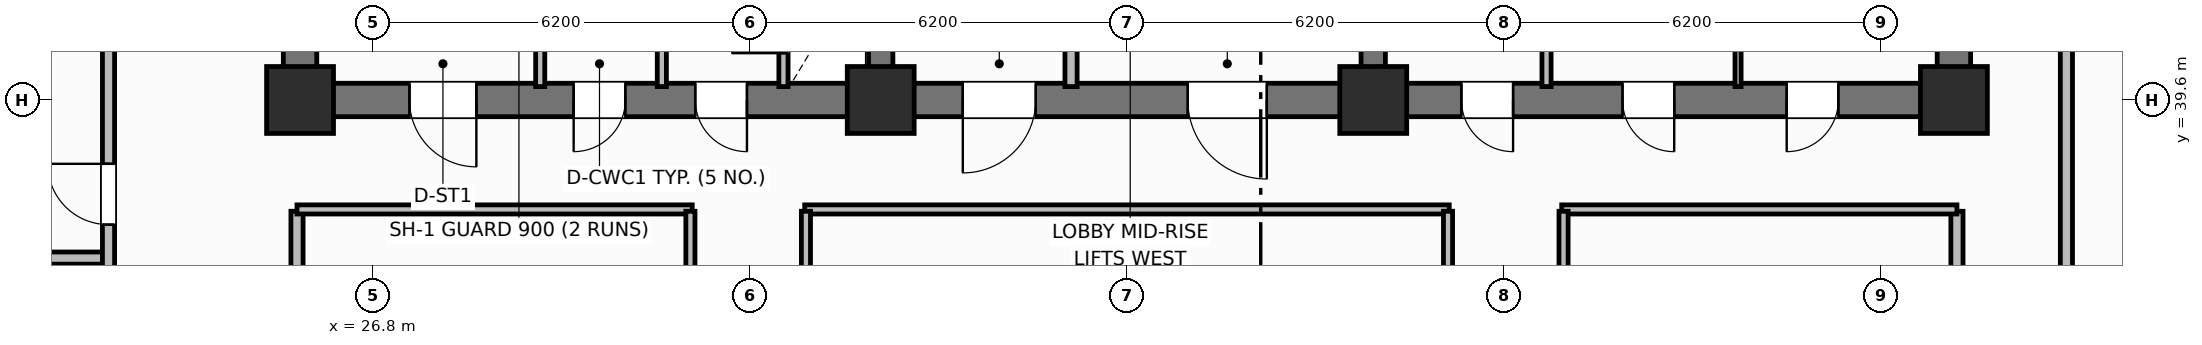
"""IFC4 building model, lengths in metres.
Left out: names, types, materials, properties, quantities, classifications, styles, units other than length and angle.
Written with IfcOpenShell. Run it as: python <this file> out.ifc"""

import sys

from ifc_helpers import new_model, si_unit, direction, frame, frame_2d, origin, origin_2d, place, context, subcontext, project, spatial, rectangle, extrude, element, fill, save


model = new_model("IFC4")
c1 = context("Model", 3, precision=1e-05, world=origin(), true_north=direction((0.0, 1.0)))
c2 = subcontext(c1, "Body", "Model", "MODEL_VIEW")
j1 = project(units=[si_unit("LENGTHUNIT", "METRE"), si_unit("PLANEANGLEUNIT", "RADIAN")], contexts=[c1])
p1 = place(None, origin())
s1 = spatial("IfcSite", under=j1, at=p1, CompositionType="ELEMENT")
p2 = place(p1, origin())
s2 = spatial("IfcBuilding", under=s1, at=p2, CompositionType="ELEMENT")
p3 = place(p2, frame((0.0, 0.0, 95.7)))
s3 = spatial("IfcBuildingStorey", under=s2, at=p3, CompositionType="ELEMENT", Elevation=95.7)
for number, where, z_axis, x_axis in (
    (1, (25.6, 39.875, 0.0), (0.0, 0.0, 1.0), (0.0, 1.0, 0.0)),
    (2, (52.8, 39.875, 0.0), (0.0, 0.0, 1.0), (0.0, 1.0, 0.0)),
):
    element("IfcWall", number, at=place(p3, frame(where, z_axis=z_axis, x_axis=x_axis)), inside=s3, PredefinedType="SHEAR", context=c2, shape_type="SweptSolid", body=[
        extrude(rectangle(XDim=5.65, YDim=0.55, at=frame_2d((2.825, 0.0))), origin(), (0.0, 0.0, 1.0), 3.7),
    ])
p4 = place(p3, frame((52.8, 39.6, 0.0), z_axis=(0.0, 0.0, 1.0), x_axis=(-1.0, 0.0, 0.0)))
e3 = element("IfcWall", 3, at=p4, inside=s3, PredefinedType="SHEAR", context=c2, shape_type="SweptSolid", body=[
    extrude(rectangle(XDim=27.2, YDim=0.55, at=frame_2d((13.6, 0.0))), origin(), (0.0, 0.0, 1.0), 3.7),
])
p5 = place(p4, frame((24.3, 0.0, 0.0)))
e4 = element("IfcOpeningElement", 4, at=p5, cuts=e3, PredefinedType="OPENING", context=c2, shape_type="SweptSolid", body=[
    extrude(rectangle(XDim=1.1, YDim=2.15, at=frame_2d((0.55, 1.075))), frame((0.0, 0.285, 0.0), z_axis=(0.0, -1.0, 0.0), x_axis=(1.0, 0.0, 0.0)), (0.0, 0.0, 1.0), 0.57),
])
p6 = place(p4, frame((21.85, 0.0, 0.0)))
e5 = element("IfcOpeningElement", 5, at=p6, cuts=e3, PredefinedType="OPENING", context=c2, shape_type="SweptSolid", body=[
    extrude(rectangle(XDim=0.85, YDim=2.1, at=frame_2d((0.425, 1.05))), frame((0.0, 0.285, 0.0), z_axis=(0.0, -1.0, 0.0), x_axis=(1.0, 0.0, 0.0)), (0.0, 0.0, 1.0), 0.57),
])
p7 = place(p4, frame((19.85, 0.0, 0.0)))
e6 = element("IfcOpeningElement", 6, at=p7, cuts=e3, PredefinedType="OPENING", context=c2, shape_type="SweptSolid", body=[
    extrude(rectangle(XDim=0.85, YDim=2.1, at=frame_2d((0.425, 1.05))), frame((0.0, 0.285, 0.0), z_axis=(0.0, -1.0, 0.0), x_axis=(1.0, 0.0, 0.0)), (0.0, 0.0, 1.0), 0.57),
])
p8 = place(p4, frame((15.1, 0.0, 0.0)))
e7 = element("IfcOpeningElement", 7, at=p8, cuts=e3, PredefinedType="OPENING", context=c2, shape_type="SweptSolid", body=[
    extrude(rectangle(XDim=1.2, YDim=2.15, at=frame_2d((0.6, 1.075))), frame((0.0, 0.285, 0.0), z_axis=(0.0, -1.0, 0.0), x_axis=(1.0, 0.0, 0.0)), (0.0, 0.0, 1.0), 0.57),
])
p9 = place(p4, frame((11.3, 0.0, 0.0)))
e8 = element("IfcOpeningElement", 8, at=p9, cuts=e3, PredefinedType="OPENING", context=c2, shape_type="SweptSolid", body=[
    extrude(rectangle(XDim=1.3, YDim=2.2, at=frame_2d((0.65, 1.1))), frame((0.0, 0.285, 0.0), z_axis=(0.0, -1.0, 0.0), x_axis=(1.0, 0.0, 0.0)), (0.0, 0.0, 1.0), 0.57),
])
p10 = place(p4, frame((7.25, 0.0, 0.0)))
e9 = element("IfcOpeningElement", 9, at=p10, cuts=e3, PredefinedType="OPENING", context=c2, shape_type="SweptSolid", body=[
    extrude(rectangle(XDim=0.85, YDim=2.1, at=frame_2d((0.425, 1.05))), frame((0.0, 0.285, 0.0), z_axis=(0.0, -1.0, 0.0), x_axis=(1.0, 0.0, 0.0)), (0.0, 0.0, 1.0), 0.57),
])
p11 = place(p4, frame((4.6, 0.0, 0.0)))
e10 = element("IfcOpeningElement", 10, at=p11, cuts=e3, PredefinedType="OPENING", context=c2, shape_type="SweptSolid", body=[
    extrude(rectangle(XDim=0.85, YDim=2.1, at=frame_2d((0.425, 1.05))), frame((0.0, 0.285, 0.0), z_axis=(0.0, -1.0, 0.0), x_axis=(1.0, 0.0, 0.0)), (0.0, 0.0, 1.0), 0.57),
])
p12 = place(p4, frame((1.9, 0.0, 0.0)))
e11 = element("IfcOpeningElement", 11, at=p12, cuts=e3, PredefinedType="OPENING", context=c2, shape_type="SweptSolid", body=[
    extrude(rectangle(XDim=0.85, YDim=2.1, at=frame_2d((0.425, 1.05))), frame((0.0, 0.285, 0.0), z_axis=(0.0, -1.0, 0.0), x_axis=(1.0, 0.0, 0.0)), (0.0, 0.0, 1.0), 0.57),
])
for number, where, z_axis, x_axis in (
    (12, (35.15, 39.875, 0.0), (0.0, 0.0, 1.0), (0.0, 1.0, 0.0)),
    (13, (43.25, 39.875, 0.0), (0.0, 0.0, 1.0), (0.0, 1.0, 0.0)),
):
    element("IfcWall", number, at=place(p3, frame(where, z_axis=z_axis, x_axis=x_axis)), inside=s3, PredefinedType="SHEAR", context=c2, shape_type="SweptSolid", body=[
        extrude(rectangle(XDim=5.65, YDim=0.4, at=frame_2d((2.825, 0.0))), origin(), (0.0, 0.0, 1.0), 3.7),
    ])
for number, where, z_axis, x_axis in (
    (14, (25.6, 39.6, 0.0), (0.0, 0.0, 1.0), (1.0, 0.0, 0.0)),
    (15, (35.15, 39.6, 0.0), (0.0, 0.0, 1.0), (1.0, 0.0, 0.0)),
    (16, (43.25, 39.6, 0.0), (0.0, 0.0, 1.0), (1.0, 0.0, 0.0)),
    (17, (52.8, 39.6, 0.0), (0.0, 0.0, 1.0), (1.0, 0.0, 0.0)),
):
    element("IfcColumn", number, at=place(p3, frame(where, z_axis=z_axis, x_axis=x_axis)), inside=s3, PredefinedType="COLUMN", context=c2, shape_type="SweptSolid", body=[
        extrude(rectangle(XDim=1.1, YDim=1.1, at=origin_2d()), origin(), (0.0, 0.0, 1.0), 3.7),
    ])
p13 = place(p3, frame((33.55, 39.82, 0.0), z_axis=(0.0, 0.0, 1.0), x_axis=(0.0, 1.0, 0.0)))
e18 = element("IfcWall", 18, at=p13, inside=s3, PredefinedType="PARTITIONING", context=c2, shape_type="SweptSolid", body=[
    extrude(rectangle(XDim=2.13, YDim=0.15, at=frame_2d((1.065, 0.0))), origin(), (0.0, 0.0, 1.0), 2.53),
])
p14 = place(p13, frame((0.55, 0.0, 0.0)))
e19 = element("IfcOpeningElement", 19, at=p14, cuts=e18, PredefinedType="OPENING", context=c2, shape_type="SweptSolid", body=[
    extrude(rectangle(XDim=0.85, YDim=2.05, at=frame_2d((0.425, 1.025))), frame((0.0, 0.085, 0.0), z_axis=(0.0, -1.0, 0.0), x_axis=(1.0, 0.0, 0.0)), (0.0, 0.0, 1.0), 0.17),
])
for number, where, z_axis, x_axis in (
    (20, (29.55, 39.82, 0.0), (0.0, 0.0, 1.0), (0.0, 1.0, 0.0)),
    (21, (31.55, 39.82, 0.0), (0.0, 0.0, 1.0), (0.0, 1.0, 0.0)),
):
    element("IfcWall", number, at=place(p3, frame(where, z_axis=z_axis, x_axis=x_axis)), inside=s3, PredefinedType="PARTITIONING", context=c2, shape_type="SweptSolid", body=[
        extrude(rectangle(XDim=2.13, YDim=0.15, at=frame_2d((1.065, 0.0))), origin(), (0.0, 0.0, 1.0), 2.53),
    ])
p15 = place(p3, frame((38.28, 39.82, 0.0), z_axis=(0.0, 0.0, 1.0), x_axis=(0.0, 1.0, 0.0)))
e22 = element("IfcWall", 22, at=p15, inside=s3, PredefinedType="PARTITIONING", context=c2, shape_type="SweptSolid", body=[
    extrude(rectangle(XDim=2.73, YDim=0.2, at=frame_2d((1.365, 0.0))), origin(), (0.0, 0.0, 1.0), 2.53),
])
p16 = place(p3, frame((46.1, 39.82, 0.0), z_axis=(0.0, 0.0, 1.0), x_axis=(0.0, 1.0, 0.0)))
e23 = element("IfcWall", 23, at=p16, inside=s3, PredefinedType="PARTITIONING", context=c2, shape_type="SweptSolid", body=[
    extrude(rectangle(XDim=2.73, YDim=0.15, at=frame_2d((1.365, 0.0))), origin(), (0.0, 0.0, 1.0), 2.53),
])
p17 = place(p3, frame((49.25, 39.82, 0.0), z_axis=(0.0, 0.0, 1.0), x_axis=(0.0, 1.0, 0.0)))
e24 = element("IfcWall", 24, at=p17, inside=s3, PredefinedType="PARTITIONING", context=c2, shape_type="SweptSolid", body=[
    extrude(rectangle(XDim=2.73, YDim=0.1, at=frame_2d((1.365, 0.0))), origin(), (0.0, 0.0, 1.0), 2.53),
])
for number, where, z_axis, x_axis in (
    (25, (25.55, 18.63, 0.0), (0.0, 0.0, 1.0), (0.0, 1.0, 0.0)),
    (26, (52.85, 18.63, 0.0), (0.0, 0.0, 1.0), (0.0, 1.0, 0.0)),
):
    element("IfcWall", number, at=place(p3, frame(where, z_axis=z_axis, x_axis=x_axis)), inside=s3, PredefinedType="PARTITIONING", context=c2, shape_type="SweptSolid", body=[
        extrude(rectangle(XDim=19.14, YDim=0.2, at=frame_2d((9.57, 0.0))), origin(), (0.0, 0.0, 1.0), 2.53),
    ])
p18 = place(p3, frame((25.55, 37.8, 0.0), z_axis=(0.0, 0.0, 1.0), x_axis=(1.0, 0.0, 0.0)))
e27 = element("IfcWall", 27, at=p18, inside=s3, PredefinedType="PARTITIONING", context=c2, shape_type="SweptSolid", body=[
    extrude(rectangle(XDim=6.5, YDim=0.15, at=frame_2d((3.25, 0.0))), origin(), (0.0, 0.0, 1.0), 2.53),
])
p19 = place(p3, frame((33.9, 37.8, 0.0), z_axis=(0.0, 0.0, 1.0), x_axis=(1.0, 0.0, 0.0)))
e28 = element("IfcWall", 28, at=p19, inside=s3, PredefinedType="PARTITIONING", context=c2, shape_type="SweptSolid", body=[
    extrude(rectangle(XDim=10.6, YDim=0.15, at=frame_2d((5.3, 0.0))), origin(), (0.0, 0.0, 1.0), 2.53),
])
p20 = place(p3, frame((46.35, 37.8, 0.0), z_axis=(0.0, 0.0, 1.0), x_axis=(1.0, 0.0, 0.0)))
e29 = element("IfcWall", 29, at=p20, inside=s3, PredefinedType="PARTITIONING", context=c2, shape_type="SweptSolid", body=[
    extrude(rectangle(XDim=6.5, YDim=0.15, at=frame_2d((3.25, 0.0))), origin(), (0.0, 0.0, 1.0), 2.53),
])
p21 = place(p3, frame((32.02, 18.63, 0.0), z_axis=(0.0, 0.0, 1.0), x_axis=(0.0, 1.0, 0.0)))
e30 = element("IfcWall", 30, at=p21, inside=s3, PredefinedType="PARTITIONING", context=c2, shape_type="SweptSolid", body=[
    extrude(rectangle(XDim=19.14, YDim=0.15, at=frame_2d((9.57, 0.0))), origin(), (0.0, 0.0, 1.0), 2.53),
])
p22 = place(p21, frame((3.0, 0.0, 0.0)))
e31 = element("IfcOpeningElement", 31, at=p22, cuts=e30, PredefinedType="OPENING", context=c2, shape_type="SweptSolid", body=[
    extrude(rectangle(XDim=0.9, YDim=2.1, at=frame_2d((0.45, 1.05))), frame((0.0, 0.085, 0.0), z_axis=(0.0, -1.0, 0.0), x_axis=(1.0, 0.0, 0.0)), (0.0, 0.0, 1.0), 0.17),
])
p23 = place(p21, frame((11.5, 0.0, 0.0)))
e32 = element("IfcOpeningElement", 32, at=p23, cuts=e30, PredefinedType="OPENING", context=c2, shape_type="SweptSolid", body=[
    extrude(rectangle(XDim=0.9, YDim=2.1, at=frame_2d((0.45, 1.05))), frame((0.0, 0.085, 0.0), z_axis=(0.0, -1.0, 0.0), x_axis=(1.0, 0.0, 0.0)), (0.0, 0.0, 1.0), 0.17),
])
p24 = place(p3, frame((33.92, 18.63, 0.0), z_axis=(0.0, 0.0, 1.0), x_axis=(0.0, 1.0, 0.0)))
e33 = element("IfcWall", 33, at=p24, inside=s3, PredefinedType="PARTITIONING", context=c2, shape_type="SweptSolid", body=[
    extrude(rectangle(XDim=19.14, YDim=0.15, at=frame_2d((9.57, 0.0))), origin(), (0.0, 0.0, 1.0), 2.53),
])
p25 = place(p24, frame((2.4, 0.0, 0.0)))
e34 = element("IfcOpeningElement", 34, at=p25, cuts=e33, PredefinedType="OPENING", context=c2, shape_type="SweptSolid", body=[
    extrude(rectangle(XDim=0.9, YDim=2.1, at=frame_2d((0.45, 1.05))), frame((0.0, 0.085, 0.0), z_axis=(0.0, -1.0, 0.0), x_axis=(1.0, 0.0, 0.0)), (0.0, 0.0, 1.0), 0.17),
])
p26 = place(p3, frame((44.48, 18.63, 0.0), z_axis=(0.0, 0.0, 1.0), x_axis=(0.0, 1.0, 0.0)))
e35 = element("IfcWall", 35, at=p26, inside=s3, PredefinedType="PARTITIONING", context=c2, shape_type="SweptSolid", body=[
    extrude(rectangle(XDim=19.14, YDim=0.15, at=frame_2d((9.57, 0.0))), origin(), (0.0, 0.0, 1.0), 2.53),
])
p27 = place(p26, frame((9.847, 0.0, 0.0)))
e36 = element("IfcOpeningElement", 36, at=p27, cuts=e35, PredefinedType="OPENING", context=c2, shape_type="SweptSolid", body=[
    extrude(rectangle(XDim=0.9, YDim=2.1, at=frame_2d((0.45, 1.05))), frame((0.0, 0.085, 0.0), z_axis=(0.0, -1.0, 0.0), x_axis=(1.0, 0.0, 0.0)), (0.0, 0.0, 1.0), 0.17),
])
p28 = place(p3, frame((46.38, 18.63, 0.0), z_axis=(0.0, 0.0, 1.0), x_axis=(0.0, 1.0, 0.0)))
e37 = element("IfcWall", 37, at=p28, inside=s3, PredefinedType="PARTITIONING", context=c2, shape_type="SweptSolid", body=[
    extrude(rectangle(XDim=19.14, YDim=0.15, at=frame_2d((9.57, 0.0))), origin(), (0.0, 0.0, 1.0), 2.53),
])
p29 = place(p28, frame((5.5, 0.0, 0.0)))
e38 = element("IfcOpeningElement", 38, at=p29, cuts=e37, PredefinedType="OPENING", context=c2, shape_type="SweptSolid", body=[
    extrude(rectangle(XDim=1.0, YDim=2.15, at=frame_2d((0.5, 1.075))), frame((0.0, 0.085, 0.0), z_axis=(0.0, -1.0, 0.0), x_axis=(1.0, 0.0, 0.0)), (0.0, 0.0, 1.0), 0.17),
])
p30 = place(p3, frame((14.57, 37.0, 0.0), z_axis=(0.0, 0.0, 1.0), x_axis=(1.0, 0.0, 0.0)))
e39 = element("IfcWall", 39, at=p30, inside=s3, PredefinedType="PARTITIONING", context=c2, shape_type="SweptSolid", body=[
    extrude(rectangle(XDim=7.88, YDim=0.2, at=frame_2d((3.94, 0.0))), origin(), (0.0, 0.0, 1.0), 2.53),
])
p31 = place(p3, frame((22.45, 10.6, 0.0), z_axis=(0.0, 0.0, 1.0), x_axis=(0.0, 1.0, 0.0)))
e40 = element("IfcWall", 40, at=p31, inside=s3, PredefinedType="PARTITIONING", context=c2, shape_type="SweptSolid", body=[
    extrude(rectangle(XDim=35.2, YDim=0.2, at=frame_2d((17.6, 0.0))), origin(), (0.0, 0.0, 1.0), 2.53),
])
p32 = place(p31, frame((2.65, 0.0, 0.0)))
e41 = element("IfcOpeningElement", 41, at=p32, cuts=e40, PredefinedType="OPENING", context=c2, shape_type="SweptSolid", body=[
    extrude(rectangle(XDim=1.0, YDim=2.15, at=frame_2d((0.5, 1.075))), frame((0.0, 0.11, 0.0), z_axis=(0.0, -1.0, 0.0), x_axis=(1.0, 0.0, 0.0)), (0.0, 0.0, 1.0), 0.22),
])
p33 = place(p31, frame((10.81, 0.0, 0.0)))
e42 = element("IfcOpeningElement", 42, at=p33, cuts=e40, PredefinedType="OPENING", context=c2, shape_type="SweptSolid", body=[
    extrude(rectangle(XDim=1.0, YDim=2.15, at=frame_2d((0.5, 1.075))), frame((0.0, 0.11, 0.0), z_axis=(0.0, -1.0, 0.0), x_axis=(1.0, 0.0, 0.0)), (0.0, 0.0, 1.0), 0.22),
])
p34 = place(p31, frame((19.54, 0.0, 0.0)))
e43 = element("IfcOpeningElement", 43, at=p34, cuts=e40, PredefinedType="OPENING", context=c2, shape_type="SweptSolid", body=[
    extrude(rectangle(XDim=1.0, YDim=2.15, at=frame_2d((0.5, 1.075))), frame((0.0, 0.11, 0.0), z_axis=(0.0, -1.0, 0.0), x_axis=(1.0, 0.0, 0.0)), (0.0, 0.0, 1.0), 0.22),
])
p35 = place(p31, frame((26.95, 0.0, 0.0)))
e44 = element("IfcOpeningElement", 44, at=p35, cuts=e40, PredefinedType="OPENING", context=c2, shape_type="SweptSolid", body=[
    extrude(rectangle(XDim=1.0, YDim=2.15, at=frame_2d((0.5, 1.075))), frame((0.0, 0.11, 0.0), z_axis=(0.0, -1.0, 0.0), x_axis=(1.0, 0.0, 0.0)), (0.0, 0.0, 1.0), 0.22),
])
p36 = place(p3, frame((54.65, 10.6, 0.0), z_axis=(0.0, 0.0, 1.0), x_axis=(0.0, 1.0, 0.0)))
e45 = element("IfcWall", 45, at=p36, inside=s3, PredefinedType="PARTITIONING", context=c2, shape_type="SweptSolid", body=[
    extrude(rectangle(XDim=35.2, YDim=0.2, at=frame_2d((17.6, 0.0))), origin(), (0.0, 0.0, 1.0), 2.53),
])
p37 = place(p36, frame((2.65, 0.0, 0.0)))
e46 = element("IfcOpeningElement", 46, at=p37, cuts=e45, PredefinedType="OPENING", context=c2, shape_type="SweptSolid", body=[
    extrude(rectangle(XDim=1.0, YDim=2.15, at=frame_2d((0.5, 1.075))), frame((0.0, 0.11, 0.0), z_axis=(0.0, -1.0, 0.0), x_axis=(1.0, 0.0, 0.0)), (0.0, 0.0, 1.0), 0.22),
])
p38 = place(p36, frame((19.95, 0.0, 0.0)))
e47 = element("IfcOpeningElement", 47, at=p38, cuts=e45, PredefinedType="OPENING", context=c2, shape_type="SweptSolid", body=[
    extrude(rectangle(XDim=1.0, YDim=2.15, at=frame_2d((0.5, 1.075))), frame((0.0, 0.11, 0.0), z_axis=(0.0, -1.0, 0.0), x_axis=(1.0, 0.0, 0.0)), (0.0, 0.0, 1.0), 0.22),
])
p39 = place(p14, origin())
e48 = element("IfcDoor", 48, at=p39, inside=s3, OperationType="SINGLE_SWING_LEFT", PredefinedType="TRAPDOOR", context=c2, shape_type="SweptSolid", body=[
    extrude(rectangle(XDim=0.85, YDim=2.05, at=frame_2d((0.425, 1.025))), frame((0.0, 0.025, 0.0), z_axis=(0.0, -1.0, 0.0), x_axis=(1.0, 0.0, 0.0)), (0.0, 0.0, 1.0), 0.05),
])
fill(e19, e48)
p40 = place(p35, origin())
e49 = element("IfcDoor", 49, at=p40, inside=s3, OperationType="SINGLE_SWING_RIGHT", PredefinedType="DOOR", context=c2, shape_type="SweptSolid", body=[
    extrude(rectangle(XDim=1.0, YDim=2.15, at=frame_2d((0.5, 1.075))), frame((0.0, 0.025, 0.0), z_axis=(0.0, -1.0, 0.0), x_axis=(1.0, 0.0, 0.0)), (0.0, 0.0, 1.0), 0.05),
])
fill(e44, e49)
p41 = place(p5, origin())
e50 = element("IfcDoor", 50, at=p41, inside=s3, OperationType="SINGLE_SWING_LEFT", PredefinedType="DOOR", context=c2, shape_type="SweptSolid", body=[
    extrude(rectangle(XDim=1.1, YDim=2.15, at=frame_2d((0.55, 1.075))), frame((0.0, 0.025, 0.0), z_axis=(0.0, -1.0, 0.0), x_axis=(1.0, 0.0, 0.0)), (0.0, 0.0, 1.0), 0.05),
])
fill(e4, e50)
p42 = place(p6, origin())
e51 = element("IfcDoor", 51, at=p42, inside=s3, OperationType="SINGLE_SWING_RIGHT", PredefinedType="DOOR", context=c2, shape_type="SweptSolid", body=[
    extrude(rectangle(XDim=0.85, YDim=2.1, at=frame_2d((0.425, 1.05))), frame((0.0, 0.025, 0.0), z_axis=(0.0, -1.0, 0.0), x_axis=(1.0, 0.0, 0.0)), (0.0, 0.0, 1.0), 0.05),
])
fill(e5, e51)
p43 = place(p7, origin())
e52 = element("IfcDoor", 52, at=p43, inside=s3, OperationType="SINGLE_SWING_LEFT", PredefinedType="DOOR", context=c2, shape_type="SweptSolid", body=[
    extrude(rectangle(XDim=0.85, YDim=2.1, at=frame_2d((0.425, 1.05))), frame((0.0, 0.025, 0.0), z_axis=(0.0, -1.0, 0.0), x_axis=(1.0, 0.0, 0.0)), (0.0, 0.0, 1.0), 0.05),
])
fill(e6, e52)
p44 = place(p8, origin())
e53 = element("IfcDoor", 53, at=p44, inside=s3, OperationType="SINGLE_SWING_RIGHT", PredefinedType="DOOR", context=c2, shape_type="SweptSolid", body=[
    extrude(rectangle(XDim=1.2, YDim=2.15, at=frame_2d((0.6, 1.075))), frame((0.0, 0.025, 0.0), z_axis=(0.0, -1.0, 0.0), x_axis=(1.0, 0.0, 0.0)), (0.0, 0.0, 1.0), 0.05),
])
fill(e7, e53)
p45 = place(p9, origin())
e54 = element("IfcDoor", 54, at=p45, inside=s3, OperationType="SINGLE_SWING_LEFT", PredefinedType="DOOR", context=c2, shape_type="SweptSolid", body=[
    extrude(rectangle(XDim=1.3, YDim=2.2, at=frame_2d((0.65, 1.1))), frame((0.0, 0.025, 0.0), z_axis=(0.0, -1.0, 0.0), x_axis=(1.0, 0.0, 0.0)), (0.0, 0.0, 1.0), 0.05),
])
fill(e8, e54)
p46 = place(p10, origin())
e55 = element("IfcDoor", 55, at=p46, inside=s3, OperationType="SINGLE_SWING_LEFT", PredefinedType="DOOR", context=c2, shape_type="SweptSolid", body=[
    extrude(rectangle(XDim=0.85, YDim=2.1, at=frame_2d((0.425, 1.05))), frame((0.0, 0.025, 0.0), z_axis=(0.0, -1.0, 0.0), x_axis=(1.0, 0.0, 0.0)), (0.0, 0.0, 1.0), 0.05),
])
fill(e9, e55)
p47 = place(p11, origin())
e56 = element("IfcDoor", 56, at=p47, inside=s3, OperationType="SINGLE_SWING_LEFT", PredefinedType="DOOR", context=c2, shape_type="SweptSolid", body=[
    extrude(rectangle(XDim=0.85, YDim=2.1, at=frame_2d((0.425, 1.05))), frame((0.0, 0.025, 0.0), z_axis=(0.0, -1.0, 0.0), x_axis=(1.0, 0.0, 0.0)), (0.0, 0.0, 1.0), 0.05),
])
fill(e10, e56)
p48 = place(p12, origin())
e57 = element("IfcDoor", 57, at=p48, inside=s3, OperationType="SINGLE_SWING_RIGHT", PredefinedType="DOOR", context=c2, shape_type="SweptSolid", body=[
    extrude(rectangle(XDim=0.85, YDim=2.1, at=frame_2d((0.425, 1.05))), frame((0.0, 0.025, 0.0), z_axis=(0.0, -1.0, 0.0), x_axis=(1.0, 0.0, 0.0)), (0.0, 0.0, 1.0), 0.05),
])
fill(e11, e57)
save(model, sys.argv[1])
